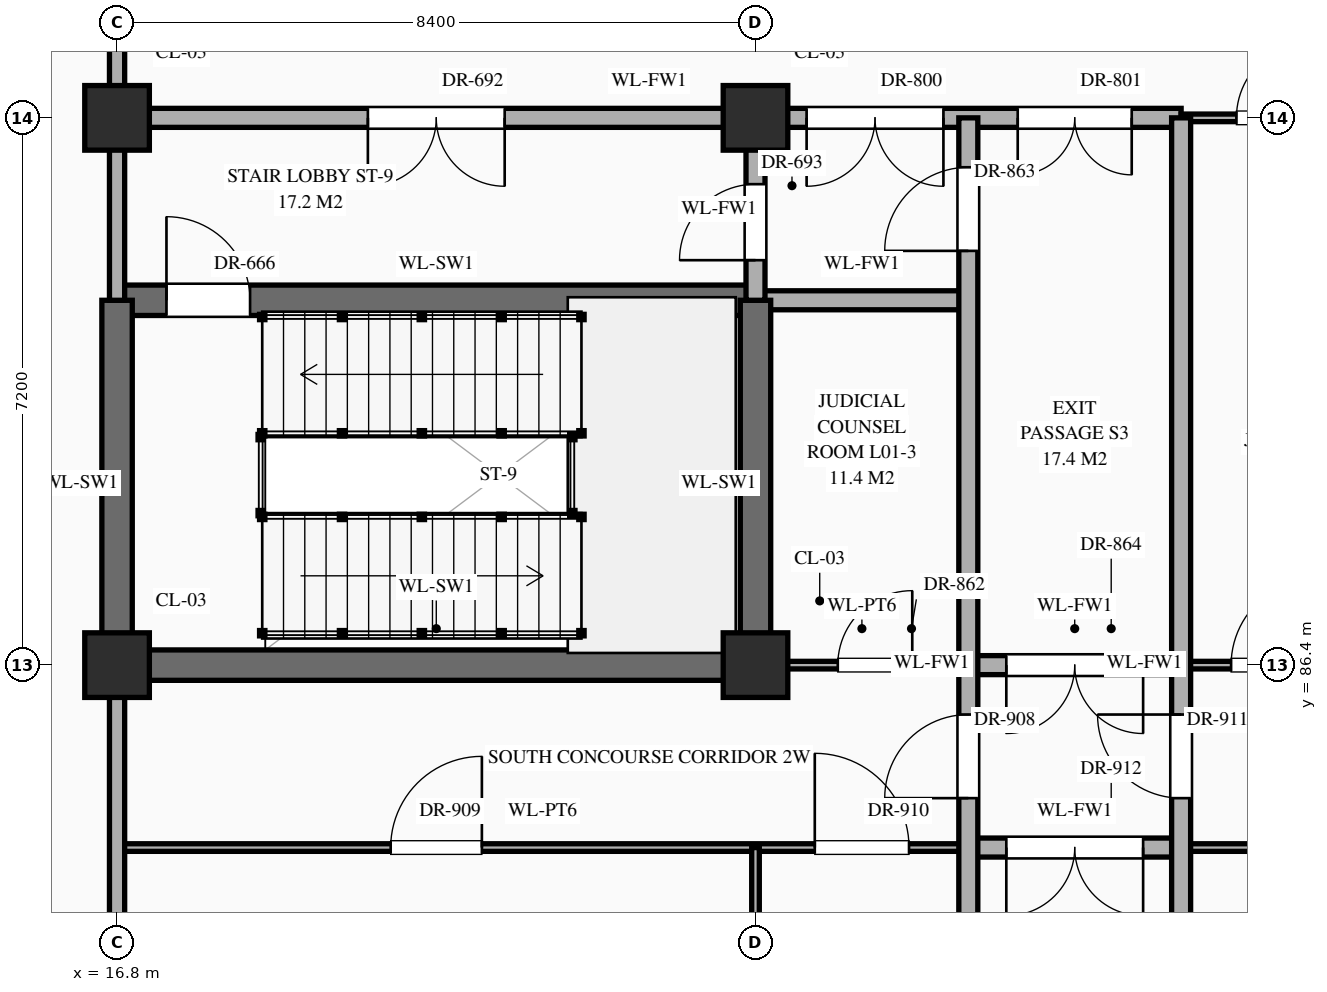
"""IFC4 building model, lengths in metres.
Left out: names, types, materials, properties, quantities, classifications, styles, units other than length and angle.
Written with IfcOpenShell. Run it as: python <this file> out.ifc"""

import sys

from ifc_helpers import new_model, si_unit, direction, frame, frame_2d, origin, origin_2d, place, context, subcontext, project, spatial, rectangle, extrude, element, fill, save


model = new_model("IFC4")
c1 = context("Model", 3, precision=1e-05, world=origin(), true_north=direction((0.0, 1.0)))
c2 = subcontext(c1, "Body", "Model", "MODEL_VIEW")
j1 = project(units=[si_unit("LENGTHUNIT", "METRE"), si_unit("PLANEANGLEUNIT", "RADIAN")], contexts=[c1])
p1 = place(None, origin())
s1 = spatial("IfcSite", under=j1, at=p1, CompositionType="ELEMENT")
p2 = place(p1, origin())
s2 = spatial("IfcBuilding", under=s1, at=p2, CompositionType="ELEMENT")
p3 = place(p2, origin())
s3 = spatial("IfcBuildingStorey", under=s2, at=p3, CompositionType="ELEMENT", Elevation=0.0)
for number, where, z_axis, x_axis in (
    (1, (16.8, 86.4, 0.0), (0.0, 0.0, 1.0), (1.0, 0.0, 0.0)),
    (2, (16.8, 93.6, 0.0), (0.0, 0.0, 1.0), (1.0, 0.0, 0.0)),
    (3, (25.2, 86.4, 0.0), (0.0, 0.0, 1.0), (1.0, 0.0, 0.0)),
    (4, (25.2, 93.6, 0.0), (0.0, 0.0, 1.0), (1.0, 0.0, 0.0)),
):
    element("IfcColumn", number, at=place(p3, frame(where, z_axis=z_axis, x_axis=x_axis)), inside=s3, PredefinedType="COLUMN", context=c2, shape_type="SweptSolid", body=[
        extrude(rectangle(XDim=0.85, YDim=0.85, at=origin_2d()), origin(), (0.0, 0.0, 1.0), 5.4),
    ])
p4 = place(p3, frame((16.8, 84.0, 0.0), z_axis=(0.0, 0.0, 1.0), x_axis=(1.0, 0.0, 0.0)))
e5 = element("IfcWall", 5, at=p4, inside=s3, PredefinedType="STANDARD", context=c2, shape_type="SweptSolid", body=[
    extrude(rectangle(XDim=11.2, YDim=0.1, at=frame_2d((5.6, 0.0))), origin(), (0.0, 0.0, 1.0), 5.12),
])
p5 = place(p4, frame((3.6, 0.0, 0.0)))
e6 = element("IfcOpeningElement", 6, at=p5, cuts=e5, PredefinedType="OPENING", context=c2, shape_type="SweptSolid", body=[
    extrude(rectangle(XDim=1.2, YDim=2.35, at=frame_2d((0.6, 1.175))), frame((0.0, 0.062, 0.0), z_axis=(0.0, -1.0, 0.0), x_axis=(1.0, 0.0, 0.0)), (0.0, 0.0, 1.0), 0.124),
])
p6 = place(p4, frame((9.18, 0.0, 0.0)))
e7 = element("IfcOpeningElement", 7, at=p6, cuts=e5, PredefinedType="OPENING", context=c2, shape_type="SweptSolid", body=[
    extrude(rectangle(XDim=1.24, YDim=2.3, at=frame_2d((0.62, 1.15))), frame((0.0, 0.062, 0.0), z_axis=(0.0, -1.0, 0.0), x_axis=(1.0, 0.0, 0.0)), (0.0, 0.0, 1.0), 0.124),
])
p7 = place(p3, frame((28.0, 84.0, 0.0), z_axis=(0.0, 0.0, 1.0), x_axis=(1.0, 0.0, 0.0)))
e8 = element("IfcWall", 8, at=p7, inside=s3, PredefinedType="STANDARD", context=c2, shape_type="SweptSolid", body=[
    extrude(rectangle(XDim=2.8, YDim=0.25, at=frame_2d((1.4, 0.0))), origin(), (0.0, 0.0, 1.0), 5.12),
])
p8 = place(p7, frame((0.5, 0.0, 0.0)))
e9 = element("IfcOpeningElement", 9, at=p8, cuts=e8, PredefinedType="OPENING", context=c2, shape_type="SweptSolid", body=[
    extrude(rectangle(XDim=1.8, YDim=2.35, at=frame_2d((0.9, 1.175))), frame((0.0, 0.137, 0.0), z_axis=(0.0, -1.0, 0.0), x_axis=(1.0, 0.0, 0.0)), (0.0, 0.0, 1.0), 0.274),
])
p9 = place(p3, frame((30.8, 84.0, 0.0), z_axis=(0.0, 0.0, 1.0), x_axis=(1.0, 0.0, 0.0)))
e10 = element("IfcWall", 10, at=p9, inside=s3, PredefinedType="STANDARD", context=c2, shape_type="SweptSolid", body=[
    extrude(rectangle(XDim=22.4, YDim=0.1, at=frame_2d((11.2, 0.0))), origin(), (0.0, 0.0, 1.0), 5.12),
])
p10 = place(p9, frame((0.89, 0.0, 0.0)))
e11 = element("IfcOpeningElement", 11, at=p10, cuts=e10, PredefinedType="OPENING", context=c2, shape_type="SweptSolid", body=[
    extrude(rectangle(XDim=1.02, YDim=2.4, at=frame_2d((0.51, 1.2))), frame((0.0, 0.062, 0.0), z_axis=(0.0, -1.0, 0.0), x_axis=(1.0, 0.0, 0.0)), (0.0, 0.0, 1.0), 0.124),
])
p11 = place(p9, frame((10.475, 0.0, 0.0)))
e12 = element("IfcOpeningElement", 12, at=p11, cuts=e10, PredefinedType="OPENING", context=c2, shape_type="SweptSolid", body=[
    extrude(rectangle(XDim=1.45, YDim=2.3, at=frame_2d((0.725, 1.15))), frame((0.0, 0.062, 0.0), z_axis=(0.0, -1.0, 0.0), x_axis=(1.0, 0.0, 0.0)), (0.0, 0.0, 1.0), 0.124),
])
p12 = place(p9, frame((20.55, 0.0, 0.0)))
e13 = element("IfcOpeningElement", 13, at=p12, cuts=e10, PredefinedType="OPENING", context=c2, shape_type="SweptSolid", body=[
    extrude(rectangle(XDim=0.9, YDim=2.15, at=frame_2d((0.45, 1.075))), frame((0.0, 0.062, 0.0), z_axis=(0.0, -1.0, 0.0), x_axis=(1.0, 0.0, 0.0)), (0.0, 0.0, 1.0), 0.124),
])
p13 = place(p3, frame((16.8, 86.4, 0.0), z_axis=(0.0, 0.0, 1.0), x_axis=(1.0, 0.0, 0.0)))
e14 = element("IfcWall", 14, at=p13, inside=s3, PredefinedType="SHEAR", context=c2, shape_type="SweptSolid", body=[
    extrude(rectangle(XDim=8.4, YDim=0.4, at=frame_2d((4.2, 0.0))), origin(), (0.0, 0.0, 1.0), 5.12),
])
p14 = place(p3, frame((25.2, 86.4, 0.0), z_axis=(0.0, 0.0, 1.0), x_axis=(1.0, 0.0, 0.0)))
e15 = element("IfcWall", 15, at=p14, inside=s3, PredefinedType="STANDARD", context=c2, shape_type="SweptSolid", body=[
    extrude(rectangle(XDim=2.8, YDim=0.1, at=frame_2d((1.4, 0.0))), origin(), (0.0, 0.0, 1.0), 4.27),
])
p15 = place(p14, frame((1.083, 0.0, 0.0)))
e16 = element("IfcOpeningElement", 16, at=p15, cuts=e15, PredefinedType="OPENING", context=c2, shape_type="SweptSolid", body=[
    extrude(rectangle(XDim=0.98, YDim=2.35, at=frame_2d((0.49, 1.175))), frame((0.0, 0.062, 0.0), z_axis=(0.0, -1.0, 0.0), x_axis=(1.0, 0.0, 0.0)), (0.0, 0.0, 1.0), 0.124),
])
p16 = place(p3, frame((28.0, 86.4, 0.0), z_axis=(0.0, 0.0, 1.0), x_axis=(1.0, 0.0, 0.0)))
e17 = element("IfcWall", 17, at=p16, inside=s3, PredefinedType="STANDARD", context=c2, shape_type="SweptSolid", body=[
    extrude(rectangle(XDim=2.8, YDim=0.25, at=frame_2d((1.4, 0.0))), origin(), (0.0, 0.0, 1.0), 4.27),
])
p17 = place(p16, frame((0.5, 0.0, 0.0)))
e18 = element("IfcOpeningElement", 18, at=p17, cuts=e17, PredefinedType="OPENING", context=c2, shape_type="SweptSolid", body=[
    extrude(rectangle(XDim=1.8, YDim=2.35, at=frame_2d((0.9, 1.175))), frame((0.0, 0.137, 0.0), z_axis=(0.0, -1.0, 0.0), x_axis=(1.0, 0.0, 0.0)), (0.0, 0.0, 1.0), 0.274),
])
p18 = place(p3, frame((30.8, 86.4, 0.0), z_axis=(0.0, 0.0, 1.0), x_axis=(1.0, 0.0, 0.0)))
e19 = element("IfcWall", 19, at=p18, inside=s3, PredefinedType="STANDARD", context=c2, shape_type="SweptSolid", body=[
    extrude(rectangle(XDim=11.2, YDim=0.1, at=frame_2d((5.6, 0.0))), origin(), (0.0, 0.0, 1.0), 4.27),
])
p19 = place(p18, frame((0.657, 0.0, 0.0)))
e20 = element("IfcOpeningElement", 20, at=p19, cuts=e19, PredefinedType="OPENING", context=c2, shape_type="SweptSolid", body=[
    extrude(rectangle(XDim=1.14, YDim=2.4, at=frame_2d((0.57, 1.2))), frame((0.0, 0.062, 0.0), z_axis=(0.0, -1.0, 0.0), x_axis=(1.0, 0.0, 0.0)), (0.0, 0.0, 1.0), 0.124),
])
p20 = place(p18, frame((6.55, 0.0, 0.0)))
e21 = element("IfcOpeningElement", 21, at=p20, cuts=e19, PredefinedType="OPENING", context=c2, shape_type="SweptSolid", body=[
    extrude(rectangle(XDim=0.9, YDim=2.15, at=frame_2d((0.45, 1.075))), frame((0.0, 0.062, 0.0), z_axis=(0.0, -1.0, 0.0), x_axis=(1.0, 0.0, 0.0)), (0.0, 0.0, 1.0), 0.124),
])
p21 = place(p3, frame((16.8, 91.2, 0.0), z_axis=(0.0, 0.0, 1.0), x_axis=(1.0, 0.0, 0.0)))
e22 = element("IfcWall", 22, at=p21, inside=s3, PredefinedType="SHEAR", context=c2, shape_type="SweptSolid", body=[
    extrude(rectangle(XDim=8.4, YDim=0.4, at=frame_2d((4.2, 0.0))), origin(), (0.0, 0.0, 1.0), 5.12),
])
p22 = place(p21, frame((0.65, 0.0, 0.0)))
e23 = element("IfcOpeningElement", 23, at=p22, cuts=e22, PredefinedType="OPENING", context=c2, shape_type="SweptSolid", body=[
    extrude(rectangle(XDim=1.1, YDim=2.2, at=frame_2d((0.55, 1.1))), frame((0.0, 0.212, 0.0), z_axis=(0.0, -1.0, 0.0), x_axis=(1.0, 0.0, 0.0)), (0.0, 0.0, 1.0), 0.424),
])
p23 = place(p3, frame((25.2, 91.2, 0.0), z_axis=(0.0, 0.0, 1.0), x_axis=(1.0, 0.0, 0.0)))
e24 = element("IfcWall", 24, at=p23, inside=s3, PredefinedType="STANDARD", context=c2, shape_type="SweptSolid", body=[
    extrude(rectangle(XDim=2.8, YDim=0.25, at=frame_2d((1.4, 0.0))), origin(), (0.0, 0.0, 1.0), 5.12),
])
p24 = place(p3, frame((16.8, 93.6, 0.0), z_axis=(0.0, 0.0, 1.0), x_axis=(1.0, 0.0, 0.0)))
e25 = element("IfcWall", 25, at=p24, inside=s3, PredefinedType="STANDARD", context=c2, shape_type="SweptSolid", body=[
    extrude(rectangle(XDim=14.0, YDim=0.25, at=frame_2d((7.0, 0.0))), origin(), (0.0, 0.0, 1.0), 4.27),
])
p25 = place(p24, frame((3.3, 0.0, 0.0)))
e26 = element("IfcOpeningElement", 26, at=p25, cuts=e25, PredefinedType="OPENING", context=c2, shape_type="SweptSolid", body=[
    extrude(rectangle(XDim=1.8, YDim=2.35, at=frame_2d((0.9, 1.175))), frame((0.0, 0.137, 0.0), z_axis=(0.0, -1.0, 0.0), x_axis=(1.0, 0.0, 0.0)), (0.0, 0.0, 1.0), 0.274),
])
p26 = place(p24, frame((9.073, 0.0, 0.0)))
e27 = element("IfcOpeningElement", 27, at=p26, cuts=e25, PredefinedType="OPENING", context=c2, shape_type="SweptSolid", body=[
    extrude(rectangle(XDim=1.8, YDim=2.35, at=frame_2d((0.9, 1.175))), frame((0.0, 0.137, 0.0), z_axis=(0.0, -1.0, 0.0), x_axis=(1.0, 0.0, 0.0)), (0.0, 0.0, 1.0), 0.274),
])
p27 = place(p24, frame((11.85, 0.0, 0.0)))
e28 = element("IfcOpeningElement", 28, at=p27, cuts=e25, PredefinedType="OPENING", context=c2, shape_type="SweptSolid", body=[
    extrude(rectangle(XDim=1.5, YDim=2.25, at=frame_2d((0.75, 1.125))), frame((0.0, 0.137, 0.0), z_axis=(0.0, -1.0, 0.0), x_axis=(1.0, 0.0, 0.0)), (0.0, 0.0, 1.0), 0.274),
])
p28 = place(p3, frame((30.8, 93.6, 0.0), z_axis=(0.0, 0.0, 1.0), x_axis=(1.0, 0.0, 0.0)))
e29 = element("IfcWall", 29, at=p28, inside=s3, PredefinedType="STANDARD", context=c2, shape_type="SweptSolid", body=[
    extrude(rectangle(XDim=11.2, YDim=0.1, at=frame_2d((5.6, 0.0))), origin(), (0.0, 0.0, 1.0), 4.27),
])
p29 = place(p28, frame((0.728, 0.0, 0.0)))
e30 = element("IfcOpeningElement", 30, at=p29, cuts=e29, PredefinedType="OPENING", context=c2, shape_type="SweptSolid", body=[
    extrude(rectangle(XDim=1.0, YDim=2.25, at=frame_2d((0.5, 1.125))), frame((0.0, 0.062, 0.0), z_axis=(0.0, -1.0, 0.0), x_axis=(1.0, 0.0, 0.0)), (0.0, 0.0, 1.0), 0.124),
])
p30 = place(p28, frame((6.48, 0.0, 0.0)))
e31 = element("IfcOpeningElement", 31, at=p30, cuts=e29, PredefinedType="OPENING", context=c2, shape_type="SweptSolid", body=[
    extrude(rectangle(XDim=1.04, YDim=2.2, at=frame_2d((0.52, 1.1))), frame((0.0, 0.062, 0.0), z_axis=(0.0, -1.0, 0.0), x_axis=(1.0, 0.0, 0.0)), (0.0, 0.0, 1.0), 0.124),
])
p31 = place(p3, frame((16.8, 79.24, 0.0), z_axis=(0.0, 0.0, 1.0), x_axis=(0.0, 1.0, 0.0)))
e32 = element("IfcWall", 32, at=p31, inside=s3, PredefinedType="STANDARD", context=c2, shape_type="SweptSolid", body=[
    extrude(rectangle(XDim=7.16, YDim=0.2, at=frame_2d((3.58, 0.0))), origin(), (0.0, 0.0, 1.0), 4.37),
])
p32 = place(p3, frame((16.8, 86.4, 0.0), z_axis=(0.0, 0.0, 1.0), x_axis=(0.0, 1.0, 0.0)))
e33 = element("IfcWall", 33, at=p32, inside=s3, PredefinedType="SHEAR", context=c2, shape_type="SweptSolid", body=[
    extrude(rectangle(XDim=4.8, YDim=0.4, at=frame_2d((2.4, 0.0))), origin(), (0.0, 0.0, 1.0), 5.12),
])
p33 = place(p3, frame((16.8, 91.2, 0.0), z_axis=(0.0, 0.0, 1.0), x_axis=(0.0, 1.0, 0.0)))
e34 = element("IfcWall", 34, at=p33, inside=s3, PredefinedType="STANDARD", context=c2, shape_type="SweptSolid", body=[
    extrude(rectangle(XDim=16.76, YDim=0.2, at=frame_2d((8.38, 0.0))), origin(), (0.0, 0.0, 1.0), 4.37),
])
p34 = place(p3, frame((25.2, 79.24, 0.0), z_axis=(0.0, 0.0, 1.0), x_axis=(0.0, 1.0, 0.0)))
e35 = element("IfcWall", 35, at=p34, inside=s3, PredefinedType="STANDARD", context=c2, shape_type="SweptSolid", body=[
    extrude(rectangle(XDim=4.76, YDim=0.1, at=frame_2d((2.38, 0.0))), origin(), (0.0, 0.0, 1.0), 4.37),
])
p35 = place(p3, frame((25.2, 86.4, 0.0), z_axis=(0.0, 0.0, 1.0), x_axis=(0.0, 1.0, 0.0)))
e36 = element("IfcWall", 36, at=p35, inside=s3, PredefinedType="SHEAR", context=c2, shape_type="SweptSolid", body=[
    extrude(rectangle(XDim=4.8, YDim=0.4, at=frame_2d((2.4, 0.0))), origin(), (0.0, 0.0, 1.0), 5.12),
])
p36 = place(p3, frame((25.2, 91.2, 0.0), z_axis=(0.0, 0.0, 1.0), x_axis=(0.0, 1.0, 0.0)))
e37 = element("IfcWall", 37, at=p36, inside=s3, PredefinedType="STANDARD", context=c2, shape_type="SweptSolid", body=[
    extrude(rectangle(XDim=2.4, YDim=0.25, at=frame_2d((1.2, 0.0))), origin(), (0.0, 0.0, 1.0), 4.37),
])
p37 = place(p36, frame((0.528, 0.0, 0.0)))
e38 = element("IfcOpeningElement", 38, at=p37, cuts=e37, PredefinedType="OPENING", context=c2, shape_type="SweptSolid", body=[
    extrude(rectangle(XDim=1.0, YDim=2.2, at=frame_2d((0.5, 1.1))), frame((0.0, 0.137, 0.0), z_axis=(0.0, -1.0, 0.0), x_axis=(1.0, 0.0, 0.0)), (0.0, 0.0, 1.0), 0.274),
])
p38 = place(p3, frame((28.0, 79.24, 0.0), z_axis=(0.0, 0.0, 1.0), x_axis=(0.0, 1.0, 0.0)))
e39 = element("IfcWall", 39, at=p38, inside=s3, PredefinedType="STANDARD", context=c2, shape_type="SweptSolid", body=[
    extrude(rectangle(XDim=14.36, YDim=0.25, at=frame_2d((7.18, 0.0))), origin(), (0.0, 0.0, 1.0), 5.12),
])
p39 = place(p38, frame((12.61, 0.0, 0.0)))
e40 = element("IfcOpeningElement", 40, at=p39, cuts=e39, PredefinedType="OPENING", context=c2, shape_type="SweptSolid", body=[
    extrude(rectangle(XDim=1.1, YDim=2.2, at=frame_2d((0.55, 1.1))), frame((0.0, 0.137, 0.0), z_axis=(0.0, -1.0, 0.0), x_axis=(1.0, 0.0, 0.0)), (0.0, 0.0, 1.0), 0.274),
])
p40 = place(p38, frame((5.41, 0.0, 0.0)))
e41 = element("IfcOpeningElement", 41, at=p40, cuts=e39, PredefinedType="OPENING", context=c2, shape_type="SweptSolid", body=[
    extrude(rectangle(XDim=1.1, YDim=2.2, at=frame_2d((0.55, 1.1))), frame((0.0, 0.137, 0.0), z_axis=(0.0, -1.0, 0.0), x_axis=(1.0, 0.0, 0.0)), (0.0, 0.0, 1.0), 0.274),
])
p41 = place(p3, frame((30.8, 79.24, 0.0), z_axis=(0.0, 0.0, 1.0), x_axis=(0.0, 1.0, 0.0)))
e42 = element("IfcWall", 42, at=p41, inside=s3, PredefinedType="STANDARD", context=c2, shape_type="SweptSolid", body=[
    extrude(rectangle(XDim=14.36, YDim=0.25, at=frame_2d((7.18, 0.0))), origin(), (0.0, 0.0, 1.0), 5.12),
])
p42 = place(p41, frame((5.41, 0.0, 0.0)))
e43 = element("IfcOpeningElement", 43, at=p42, cuts=e42, PredefinedType="OPENING", context=c2, shape_type="SweptSolid", body=[
    extrude(rectangle(XDim=1.1, YDim=2.2, at=frame_2d((0.55, 1.1))), frame((0.0, 0.137, 0.0), z_axis=(0.0, -1.0, 0.0), x_axis=(1.0, 0.0, 0.0)), (0.0, 0.0, 1.0), 0.274),
])
p43 = place(p22, origin())
e44 = element("IfcDoor", 44, at=p43, inside=s3, OperationType="SINGLE_SWING_LEFT", PredefinedType="DOOR", context=c2, shape_type="SweptSolid", body=[
    extrude(rectangle(XDim=1.1, YDim=2.2, at=frame_2d((0.55, 1.1))), frame((0.0, 0.025, 0.0), z_axis=(0.0, -1.0, 0.0), x_axis=(1.0, 0.0, 0.0)), (0.0, 0.0, 1.0), 0.05),
])
fill(e23, e44)
p44 = place(p25, frame((1.8, 0.0, 0.0), z_axis=(0.0, 0.0, 1.0), x_axis=(-1.0, 0.0, 0.0)))
e45 = element("IfcDoor", 45, at=p44, inside=s3, OperationType="DOUBLE_DOOR_SINGLE_SWING", PredefinedType="DOOR", context=c2, shape_type="SweptSolid", body=[
    extrude(rectangle(XDim=1.8, YDim=2.35, at=frame_2d((0.9, 1.175))), frame((0.0, 0.025, 0.0), z_axis=(0.0, -1.0, 0.0), x_axis=(1.0, 0.0, 0.0)), (0.0, 0.0, 1.0), 0.05),
])
fill(e26, e45)
p45 = place(p37, origin())
e46 = element("IfcDoor", 46, at=p45, inside=s3, OperationType="SINGLE_SWING_LEFT", PredefinedType="DOOR", context=c2, shape_type="SweptSolid", body=[
    extrude(rectangle(XDim=1.0, YDim=2.2, at=frame_2d((0.5, 1.1))), frame((0.0, 0.025, 0.0), z_axis=(0.0, -1.0, 0.0), x_axis=(1.0, 0.0, 0.0)), (0.0, 0.0, 1.0), 0.05),
])
fill(e38, e46)
p46 = place(p26, frame((1.8, 0.0, 0.0), z_axis=(0.0, 0.0, 1.0), x_axis=(-1.0, 0.0, 0.0)))
e47 = element("IfcDoor", 47, at=p46, inside=s3, OperationType="DOUBLE_DOOR_SINGLE_SWING", PredefinedType="DOOR", context=c2, shape_type="SweptSolid", body=[
    extrude(rectangle(XDim=1.8, YDim=2.35, at=frame_2d((0.9, 1.175))), frame((0.0, 0.025, 0.0), z_axis=(0.0, -1.0, 0.0), x_axis=(1.0, 0.0, 0.0)), (0.0, 0.0, 1.0), 0.05),
])
fill(e27, e47)
p47 = place(p27, frame((1.5, 0.0, 0.0), z_axis=(0.0, 0.0, 1.0), x_axis=(-1.0, 0.0, 0.0)))
e48 = element("IfcDoor", 48, at=p47, inside=s3, OperationType="DOUBLE_DOOR_SINGLE_SWING", PredefinedType="DOOR", context=c2, shape_type="SweptSolid", body=[
    extrude(rectangle(XDim=1.5, YDim=2.25, at=frame_2d((0.75, 1.125))), frame((0.0, 0.025, 0.0), z_axis=(0.0, -1.0, 0.0), x_axis=(1.0, 0.0, 0.0)), (0.0, 0.0, 1.0), 0.05),
])
fill(e28, e48)
p48 = place(p29, origin())
e49 = element("IfcDoor", 49, at=p48, inside=s3, OperationType="SINGLE_SWING_RIGHT", PredefinedType="DOOR", context=c2, shape_type="SweptSolid", body=[
    extrude(rectangle(XDim=1.0, YDim=2.25, at=frame_2d((0.5, 1.125))), frame((0.0, 0.025, 0.0), z_axis=(0.0, -1.0, 0.0), x_axis=(1.0, 0.0, 0.0)), (0.0, 0.0, 1.0), 0.05),
])
fill(e30, e49)
p49 = place(p15, origin())
e50 = element("IfcDoor", 50, at=p49, inside=s3, OperationType="SINGLE_SWING_RIGHT", PredefinedType="DOOR", context=c2, shape_type="SweptSolid", body=[
    extrude(rectangle(XDim=0.98, YDim=2.35, at=frame_2d((0.49, 1.175))), frame((0.0, 0.025, 0.0), z_axis=(0.0, -1.0, 0.0), x_axis=(1.0, 0.0, 0.0)), (0.0, 0.0, 1.0), 0.05),
])
fill(e16, e50)
p50 = place(p39, origin())
e51 = element("IfcDoor", 51, at=p50, inside=s3, OperationType="SINGLE_SWING_LEFT", PredefinedType="DOOR", context=c2, shape_type="SweptSolid", body=[
    extrude(rectangle(XDim=1.1, YDim=2.2, at=frame_2d((0.55, 1.1))), frame((0.0, 0.025, 0.0), z_axis=(0.0, -1.0, 0.0), x_axis=(1.0, 0.0, 0.0)), (0.0, 0.0, 1.0), 0.05),
])
fill(e40, e51)
p51 = place(p17, frame((1.8, 0.0, 0.0), z_axis=(0.0, 0.0, 1.0), x_axis=(-1.0, 0.0, 0.0)))
e52 = element("IfcDoor", 52, at=p51, inside=s3, OperationType="DOUBLE_DOOR_SINGLE_SWING", PredefinedType="DOOR", context=c2, shape_type="SweptSolid", body=[
    extrude(rectangle(XDim=1.8, YDim=2.35, at=frame_2d((0.9, 1.175))), frame((0.0, 0.025, 0.0), z_axis=(0.0, -1.0, 0.0), x_axis=(1.0, 0.0, 0.0)), (0.0, 0.0, 1.0), 0.05),
])
fill(e18, e52)
p52 = place(p19, origin())
e53 = element("IfcDoor", 53, at=p52, inside=s3, OperationType="SINGLE_SWING_RIGHT", PredefinedType="DOOR", context=c2, shape_type="SweptSolid", body=[
    extrude(rectangle(XDim=1.14, YDim=2.4, at=frame_2d((0.57, 1.2))), frame((0.0, 0.025, 0.0), z_axis=(0.0, -1.0, 0.0), x_axis=(1.0, 0.0, 0.0)), (0.0, 0.0, 1.0), 0.05),
])
fill(e20, e53)
p53 = place(p40, origin())
e54 = element("IfcDoor", 54, at=p53, inside=s3, OperationType="SINGLE_SWING_LEFT", PredefinedType="DOOR", context=c2, shape_type="SweptSolid", body=[
    extrude(rectangle(XDim=1.1, YDim=2.2, at=frame_2d((0.55, 1.1))), frame((0.0, 0.025, 0.0), z_axis=(0.0, -1.0, 0.0), x_axis=(1.0, 0.0, 0.0)), (0.0, 0.0, 1.0), 0.05),
])
fill(e41, e54)
p54 = place(p5, origin())
e55 = element("IfcDoor", 55, at=p54, inside=s3, OperationType="SINGLE_SWING_RIGHT", PredefinedType="DOOR", context=c2, shape_type="SweptSolid", body=[
    extrude(rectangle(XDim=1.2, YDim=2.35, at=frame_2d((0.6, 1.175))), frame((0.0, 0.025, 0.0), z_axis=(0.0, -1.0, 0.0), x_axis=(1.0, 0.0, 0.0)), (0.0, 0.0, 1.0), 0.05),
])
fill(e6, e55)
p55 = place(p6, origin())
e56 = element("IfcDoor", 56, at=p55, inside=s3, OperationType="SINGLE_SWING_LEFT", PredefinedType="DOOR", context=c2, shape_type="SweptSolid", body=[
    extrude(rectangle(XDim=1.24, YDim=2.3, at=frame_2d((0.62, 1.15))), frame((0.0, 0.025, 0.0), z_axis=(0.0, -1.0, 0.0), x_axis=(1.0, 0.0, 0.0)), (0.0, 0.0, 1.0), 0.05),
])
fill(e7, e56)
p56 = place(p42, origin())
e57 = element("IfcDoor", 57, at=p56, inside=s3, OperationType="SINGLE_SWING_RIGHT", PredefinedType="DOOR", context=c2, shape_type="SweptSolid", body=[
    extrude(rectangle(XDim=1.1, YDim=2.2, at=frame_2d((0.55, 1.1))), frame((0.0, 0.025, 0.0), z_axis=(0.0, -1.0, 0.0), x_axis=(1.0, 0.0, 0.0)), (0.0, 0.0, 1.0), 0.05),
])
fill(e43, e57)
p57 = place(p8, frame((1.8, 0.0, 0.0), z_axis=(0.0, 0.0, 1.0), x_axis=(-1.0, 0.0, 0.0)))
e58 = element("IfcDoor", 58, at=p57, inside=s3, OperationType="DOUBLE_DOOR_SINGLE_SWING", PredefinedType="DOOR", context=c2, shape_type="SweptSolid", body=[
    extrude(rectangle(XDim=1.8, YDim=2.35, at=frame_2d((0.9, 1.175))), frame((0.0, 0.025, 0.0), z_axis=(0.0, -1.0, 0.0), x_axis=(1.0, 0.0, 0.0)), (0.0, 0.0, 1.0), 0.05),
])
fill(e9, e58)
save(model, sys.argv[1])
